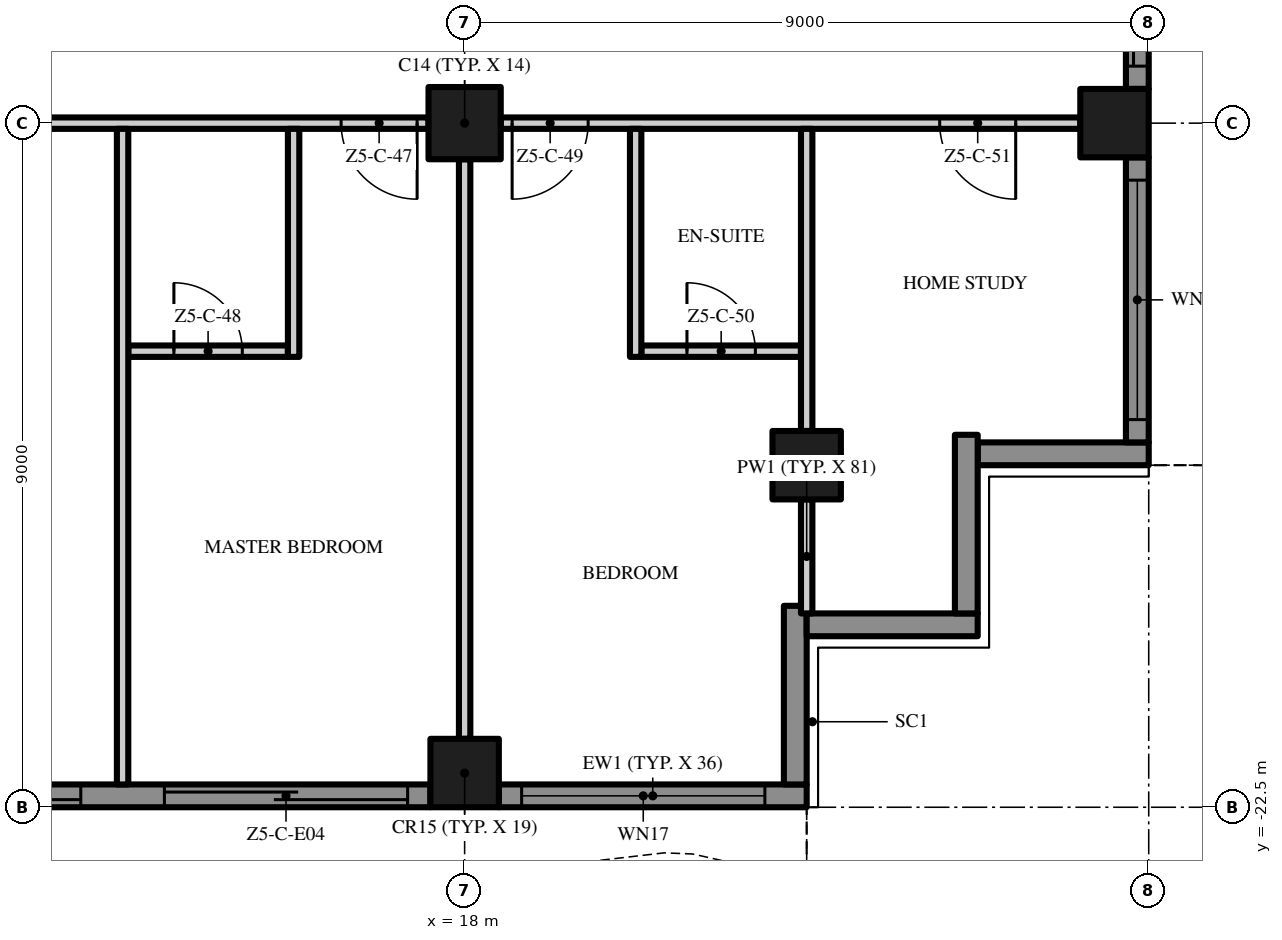
"""IFC4 building model, lengths in metres.
Left out: names, types, materials, properties, quantities, classifications, styles, units other than length and angle.
Written with IfcOpenShell. Run it as: python <this file> out.ifc"""

import sys

from ifc_helpers import new_model, si_unit, direction, frame, frame_2d, origin, origin_2d, place, context, subcontext, project, spatial, polyline, rectangle, outline, extrude, element, fill, save


model = new_model("IFC4")
c1 = context("Model", 3, precision=1e-05, world=origin(), true_north=direction((0.0, 1.0)))
c2 = subcontext(c1, "Body", "Model", "MODEL_VIEW")
j1 = project(units=[si_unit("LENGTHUNIT", "METRE"), si_unit("PLANEANGLEUNIT", "RADIAN")], contexts=[c1])
p1 = place(None, origin())
s1 = spatial("IfcSite", under=j1, at=p1, CompositionType="ELEMENT")
p2 = place(p1, origin())
s2 = spatial("IfcBuilding", under=s1, at=p2, CompositionType="ELEMENT")
p3 = place(p2, frame((0.0, 0.0, 269.2)))
s3 = spatial("IfcBuildingStorey", under=s2, at=p3, CompositionType="ELEMENT", Elevation=269.2)
p4 = place(p3, frame((18.0, -13.5, 0.0), z_axis=(0.0, 0.0, 1.0), x_axis=(1.0, 0.0, 0.0)))
e1 = element("IfcColumn", 1, at=p4, inside=s3, PredefinedType="COLUMN", context=c2, shape_type="SweptSolid", body=[
    extrude(rectangle(XDim=0.95, YDim=0.95, at=origin_2d()), origin(), (0.0, 0.0, 1.0), 3.5),
])
for number, where, z_axis, x_axis in (
    (2, (18.0, -22.05, 0.0), (0.0, 0.0, 1.0), (1.0, 0.0, 0.0)),
    (3, (26.55, -13.5, 0.0), (0.0, 0.0, 1.0), (1.0, 0.0, 0.0)),
    (4, (22.5, -18.0, 0.0), (0.0, 0.0, 1.0), (1.0, 0.0, 0.0)),
):
    element("IfcColumn", number, at=place(p3, frame(where, z_axis=z_axis, x_axis=x_axis)), inside=s3, PredefinedType="COLUMN", context=c2, shape_type="SweptSolid", body=[
        extrude(rectangle(XDim=0.9, YDim=0.9, at=origin_2d()), origin(), (0.0, 0.0, 1.0), 3.5),
    ])
p5 = place(p3, frame((17.55, -22.35, 0.0), z_axis=(0.0, 0.0, 1.0), x_axis=(-1.0, 0.0, 0.0)))
e5 = element("IfcWall", 5, at=p5, inside=s3, PredefinedType="SOLIDWALL", context=c2, shape_type="SweptSolid", body=[
    extrude(rectangle(XDim=8.1, YDim=0.3, at=frame_2d((4.05, 0.0))), origin(), (0.0, 0.0, 1.0), 3.5),
])
p6 = place(p5, frame((4.6, 0.0, 0.0)))
e6 = element("IfcOpeningElement", 6, at=p6, cuts=e5, PredefinedType="OPENING", context=c2, shape_type="SweptSolid", body=[
    extrude(rectangle(XDim=3.2, YDim=2.4, at=frame_2d((1.6, 1.2))), frame((0.0, 0.16, 0.0), z_axis=(0.0, -1.0, 0.0), x_axis=(1.0, 0.0, 0.0)), (0.0, 0.0, 1.0), 0.32),
])
p7 = place(p5, frame((0.3, 0.0, 0.0)))
e7 = element("IfcOpeningElement", 7, at=p7, cuts=e5, PredefinedType="OPENING", context=c2, shape_type="SweptSolid", body=[
    extrude(rectangle(XDim=3.2, YDim=2.4, at=frame_2d((1.6, 1.2))), frame((0.0, 0.16, 0.0), z_axis=(0.0, -1.0, 0.0), x_axis=(1.0, 0.0, 0.0)), (0.0, 0.0, 1.0), 0.32),
])
p8 = place(p3, frame((22.5, -22.35, 0.0), z_axis=(0.0, 0.0, 1.0), x_axis=(-1.0, 0.0, 0.0)))
e8 = element("IfcWall", 8, at=p8, inside=s3, PredefinedType="SOLIDWALL", context=c2, shape_type="SweptSolid", body=[
    extrude(rectangle(XDim=4.05, YDim=0.3, at=frame_2d((2.025, 0.0))), origin(), (0.0, 0.0, 1.0), 3.5),
])
p9 = place(p8, frame((0.55, 0.0, 0.45)))
e9 = element("IfcOpeningElement", 9, at=p9, cuts=e8, PredefinedType="OPENING", context=c2, shape_type="SweptSolid", body=[
    extrude(rectangle(XDim=3.2, YDim=2.65, at=frame_2d((1.6, 1.325))), frame((0.0, 0.16, 0.0), z_axis=(0.0, -1.0, 0.0), x_axis=(1.0, 0.0, 0.0)), (0.0, 0.0, 1.0), 0.32),
])
p10 = place(p3, frame((22.35, -19.85, 0.0), z_axis=(0.0, 0.0, 1.0), x_axis=(0.0, -1.0, 0.0)))
e10 = element("IfcWall", 10, at=p10, inside=s3, PredefinedType="SOLIDWALL", context=c2, shape_type="SweptSolid", body=[
    extrude(rectangle(XDim=2.35, YDim=0.3, at=frame_2d((1.175, 0.0))), origin(), (0.0, 0.0, 1.0), 3.5),
])
p11 = place(p3, frame((24.75, -20.1, 0.0), z_axis=(0.0, 0.0, 1.0), x_axis=(-1.0, 0.0, 0.0)))
e11 = element("IfcWall", 11, at=p11, inside=s3, PredefinedType="SOLIDWALL", context=c2, shape_type="SweptSolid", body=[
    extrude(rectangle(XDim=2.25, YDim=0.3, at=frame_2d((1.125, 0.0))), origin(), (0.0, 0.0, 1.0), 3.5),
])
p12 = place(p3, frame((24.6, -17.6, 0.0), z_axis=(0.0, 0.0, 1.0), x_axis=(0.0, -1.0, 0.0)))
e12 = element("IfcWall", 12, at=p12, inside=s3, PredefinedType="SOLIDWALL", context=c2, shape_type="SweptSolid", body=[
    extrude(rectangle(XDim=2.35, YDim=0.3, at=frame_2d((1.175, 0.0))), origin(), (0.0, 0.0, 1.0), 3.5),
])
p13 = place(p3, frame((27.0, -17.85, 0.0), z_axis=(0.0, 0.0, 1.0), x_axis=(-1.0, 0.0, 0.0)))
e13 = element("IfcWall", 13, at=p13, inside=s3, PredefinedType="SOLIDWALL", context=c2, shape_type="SweptSolid", body=[
    extrude(rectangle(XDim=2.25, YDim=0.3, at=frame_2d((1.125, 0.0))), origin(), (0.0, 0.0, 1.0), 3.5),
])
p14 = place(p3, frame((26.85, -13.95, 0.0), z_axis=(0.0, 0.0, 1.0), x_axis=(0.0, -1.0, 0.0)))
e14 = element("IfcWall", 14, at=p14, inside=s3, PredefinedType="SOLIDWALL", context=c2, shape_type="SweptSolid", body=[
    extrude(rectangle(XDim=3.75, YDim=0.3, at=frame_2d((1.875, 0.0))), origin(), (0.0, 0.0, 1.0), 3.5),
])
p15 = place(p14, frame((0.3, 0.0, 0.45)))
e15 = element("IfcOpeningElement", 15, at=p15, cuts=e14, PredefinedType="OPENING", context=c2, shape_type="SweptSolid", body=[
    extrude(rectangle(XDim=3.15, YDim=2.65, at=frame_2d((1.575, 1.325))), frame((0.0, 0.16, 0.0), z_axis=(0.0, -1.0, 0.0), x_axis=(1.0, 0.0, 0.0)), (0.0, 0.0, 1.0), 0.32),
])
p16 = place(p3, frame((26.85, -4.95, 0.0), z_axis=(0.0, 0.0, 1.0), x_axis=(0.0, -1.0, 0.0)))
e16 = element("IfcWall", 16, at=p16, inside=s3, PredefinedType="SOLIDWALL", context=c2, shape_type="SweptSolid", body=[
    extrude(rectangle(XDim=8.1, YDim=0.3, at=frame_2d((4.05, 0.0))), origin(), (0.0, 0.0, 1.0), 3.5),
])
p17 = place(p16, frame((4.6, 0.0, 0.0)))
e17 = element("IfcOpeningElement", 17, at=p17, cuts=e16, PredefinedType="OPENING", context=c2, shape_type="SweptSolid", body=[
    extrude(rectangle(XDim=3.2, YDim=2.4, at=frame_2d((1.6, 1.2))), frame((0.0, 0.16, 0.0), z_axis=(0.0, -1.0, 0.0), x_axis=(1.0, 0.0, 0.0)), (0.0, 0.0, 1.0), 0.32),
])
p18 = place(p16, frame((0.3, 0.0, 0.45)))
e18 = element("IfcOpeningElement", 18, at=p18, cuts=e16, PredefinedType="OPENING", context=c2, shape_type="SweptSolid", body=[
    extrude(rectangle(XDim=3.2, YDim=2.65, at=frame_2d((1.6, 1.325))), frame((0.0, 0.16, 0.0), z_axis=(0.0, -1.0, 0.0), x_axis=(1.0, 0.0, 0.0)), (0.0, 0.0, 1.0), 0.32),
])
p19 = place(p3, origin())
e19 = element("IfcWall", 19, at=p19, inside=s3, PredefinedType="USERDEFINED", context=c2, shape_type="SweptSolid", body=[
    extrude(outline(polyline([(-22.5, -23.451), (-21.0, -24.112), (-19.5, -24.845), (-18.0, -25.369), (-16.875, -25.5), (-16.5, -25.485), (-15.0, -25.149), (-13.5, -24.488), (-12.0, -23.755), (-10.5, -23.231), (-9.375, -23.1), (-9.0, -23.115), (-7.5, -23.451), (-6.0, -24.112), (-4.5, -24.845), (-3.0, -25.369), (-1.875, -25.5), (-1.5, -25.485), (0.0, -25.149), (1.5, -24.488), (3.0, -23.755), (4.5, -23.231), (5.625, -23.1), (6.0, -23.115), (7.5, -23.451), (9.0, -24.112), (10.5, -24.845), (12.0, -25.369), (13.125, -25.5), (13.5, -25.485), (15.0, -25.149), (16.5, -24.488), (18.0, -23.755), (19.5, -23.231), (20.625, -23.1), (21.0, -23.115), (22.5, -23.451), (22.555, -23.208), (21.033, -22.866), (20.615, -22.849), (19.444, -22.986), (17.904, -23.524), (16.395, -24.261), (14.921, -24.91), (13.467, -25.236), (13.135, -25.249), (12.056, -25.124), (10.596, -24.614), (9.105, -23.885), (7.579, -23.213), (6.033, -22.866), (5.615, -22.849), (4.444, -22.986), (2.904, -23.524), (1.395, -24.261), (-0.079, -24.91), (-1.533, -25.236), (-1.865, -25.249), (-2.944, -25.124), (-4.404, -24.614), (-5.895, -23.885), (-7.421, -23.213), (-8.967, -22.866), (-9.385, -22.849), (-10.556, -22.986), (-12.096, -23.524), (-13.605, -24.261), (-15.079, -24.91), (-16.533, -25.236), (-16.865, -25.249), (-17.944, -25.124), (-19.404, -24.614), (-20.895, -23.885), (-22.399, -23.223), (-22.5, -23.451)])), origin(), (0.0, 0.0, 1.0), 0.9),
])
p20 = place(p3, origin())
e20 = element("IfcWall", 20, at=p20, inside=s3, PredefinedType="USERDEFINED", context=c2, shape_type="SweptSolid", body=[
    extrude(outline(polyline([(27.951, -18.0), (28.612, -16.5), (29.345, -15.0), (29.869, -13.5), (30.0, -12.375), (29.985, -12.0), (29.649, -10.5), (28.988, -9.0), (28.255, -7.5), (27.731, -6.0), (27.6, -4.875), (27.615, -4.5), (27.951, -3.0), (28.612, -1.5), (29.345, 0.0), (29.869, 1.5), (30.0, 2.625), (29.985, 3.0), (29.649, 4.5), (28.988, 6.0), (28.255, 7.5), (27.731, 9.0), (27.6, 10.125), (27.615, 10.5), (27.951, 12.0), (28.612, 13.5), (29.345, 15.0), (29.869, 16.5), (30.0, 17.625), (29.985, 18.0), (29.735, 17.99), (29.749, 17.635), (29.624, 16.556), (29.114, 15.096), (28.385, 13.605), (27.713, 12.079), (27.366, 10.533), (27.349, 10.115), (27.486, 8.944), (28.024, 7.404), (28.761, 5.895), (29.41, 4.421), (29.736, 2.967), (29.749, 2.635), (29.624, 1.556), (29.114, 0.096), (28.385, -1.395), (27.713, -2.921), (27.366, -4.467), (27.349, -4.885), (27.486, -6.056), (28.024, -7.596), (28.761, -9.105), (29.41, -10.579), (29.736, -12.033), (29.749, -12.365), (29.624, -13.444), (29.114, -14.904), (28.385, -16.395), (27.723, -17.899), (27.951, -18.0)])), origin(), (0.0, 0.0, 1.0), 0.9),
])
p21 = place(p3, frame((13.575, -16.5, 0.0), z_axis=(0.0, 0.0, 1.0), x_axis=(1.0, 0.0, 0.0)))
e21 = element("IfcWall", 21, at=p21, inside=s3, PredefinedType="PARTITIONING", context=c2, shape_type="SweptSolid", body=[
    extrude(rectangle(XDim=2.1, YDim=0.15, at=frame_2d((1.05, 0.0))), origin(), (0.0, 0.0, 1.0), 3.5),
])
p22 = place(p21, frame((0.6, 0.0, 0.0)))
e22 = element("IfcOpeningElement", 22, at=p22, cuts=e21, PredefinedType="OPENING", context=c2, shape_type="SweptSolid", body=[
    extrude(rectangle(XDim=0.9, YDim=2.1, at=frame_2d((0.45, 1.05))), frame((0.0, 0.085, 0.0), z_axis=(0.0, -1.0, 0.0), x_axis=(1.0, 0.0, 0.0)), (0.0, 0.0, 1.0), 0.17),
])
p23 = place(p3, frame((20.325, -16.5, 0.0), z_axis=(0.0, 0.0, 1.0), x_axis=(1.0, 0.0, 0.0)))
e23 = element("IfcWall", 23, at=p23, inside=s3, PredefinedType="PARTITIONING", context=c2, shape_type="SweptSolid", body=[
    extrude(rectangle(XDim=2.1, YDim=0.15, at=frame_2d((1.05, 0.0))), origin(), (0.0, 0.0, 1.0), 3.5),
])
p24 = place(p23, frame((0.6, 0.0, 0.0)))
e24 = element("IfcOpeningElement", 24, at=p24, cuts=e23, PredefinedType="OPENING", context=c2, shape_type="SweptSolid", body=[
    extrude(rectangle(XDim=0.9, YDim=2.1, at=frame_2d((0.45, 1.05))), frame((0.0, 0.085, 0.0), z_axis=(0.0, -1.0, 0.0), x_axis=(1.0, 0.0, 0.0)), (0.0, 0.0, 1.0), 0.17),
])
p25 = place(p3, frame((17.525, -13.5, 0.0), z_axis=(0.0, 0.0, 1.0), x_axis=(-1.0, 0.0, 0.0)))
e25 = element("IfcWall", 25, at=p25, inside=s3, PredefinedType="PARTITIONING", context=c2, shape_type="SweptSolid", body=[
    extrude(rectangle(XDim=8.05, YDim=0.15, at=frame_2d((4.025, 0.0))), origin(), (0.0, 0.0, 1.0), 3.5),
])
p26 = place(p25, frame((6.1, 0.0, 0.0)))
e26 = element("IfcOpeningElement", 26, at=p26, cuts=e25, PredefinedType="OPENING", context=c2, shape_type="SweptSolid", body=[
    extrude(rectangle(XDim=1.8, YDim=2.4, at=frame_2d((0.9, 1.2))), frame((0.0, 0.085, 0.0), z_axis=(0.0, -1.0, 0.0), x_axis=(1.0, 0.0, 0.0)), (0.0, 0.0, 1.0), 0.17),
])
p27 = place(p25, frame((0.15, 0.0, 0.0)))
e27 = element("IfcOpeningElement", 27, at=p27, cuts=e25, PredefinedType="OPENING", context=c2, shape_type="SweptSolid", body=[
    extrude(rectangle(XDim=1.0, YDim=2.4, at=frame_2d((0.5, 1.2))), frame((0.0, 0.085, 0.0), z_axis=(0.0, -1.0, 0.0), x_axis=(1.0, 0.0, 0.0)), (0.0, 0.0, 1.0), 0.17),
])
p28 = place(p3, frame((26.1, -13.5, 0.0), z_axis=(0.0, 0.0, 1.0), x_axis=(-1.0, 0.0, 0.0)))
e28 = element("IfcWall", 28, at=p28, inside=s3, PredefinedType="PARTITIONING", context=c2, shape_type="SweptSolid", body=[
    extrude(rectangle(XDim=7.625, YDim=0.15, at=frame_2d((3.812, 0.0))), origin(), (0.0, 0.0, 1.0), 3.5),
])
p29 = place(p28, frame((6.475, 0.0, 0.0)))
e29 = element("IfcOpeningElement", 29, at=p29, cuts=e28, PredefinedType="OPENING", context=c2, shape_type="SweptSolid", body=[
    extrude(rectangle(XDim=1.0, YDim=2.4, at=frame_2d((0.5, 1.2))), frame((0.0, 0.085, 0.0), z_axis=(0.0, -1.0, 0.0), x_axis=(1.0, 0.0, 0.0)), (0.0, 0.0, 1.0), 0.17),
])
p30 = place(p28, frame((0.85, 0.0, 0.0)))
e30 = element("IfcOpeningElement", 30, at=p30, cuts=e28, PredefinedType="OPENING", context=c2, shape_type="SweptSolid", body=[
    extrude(rectangle(XDim=1.0, YDim=2.4, at=frame_2d((0.5, 1.2))), frame((0.0, 0.085, 0.0), z_axis=(0.0, -1.0, 0.0), x_axis=(1.0, 0.0, 0.0)), (0.0, 0.0, 1.0), 0.17),
])
p31 = place(p3, frame((13.5, -22.2, 0.0), z_axis=(0.0, 0.0, 1.0), x_axis=(0.0, 1.0, 0.0)))
e31 = element("IfcWall", 31, at=p31, inside=s3, PredefinedType="PARTITIONING", context=c2, shape_type="SweptSolid", body=[
    extrude(rectangle(XDim=8.625, YDim=0.15, at=frame_2d((4.312, 0.0))), origin(), (0.0, 0.0, 1.0), 3.5),
])
p32 = place(p3, frame((15.75, -16.575, 0.0), z_axis=(0.0, 0.0, 1.0), x_axis=(0.0, 1.0, 0.0)))
e32 = element("IfcWall", 32, at=p32, inside=s3, PredefinedType="PARTITIONING", context=c2, shape_type="SweptSolid", body=[
    extrude(rectangle(XDim=3.0, YDim=0.15, at=frame_2d((1.5, 0.0))), origin(), (0.0, 0.0, 1.0), 3.5),
])
p33 = place(p3, frame((18.0, -21.6, 0.0), z_axis=(0.0, 0.0, 1.0), x_axis=(0.0, 1.0, 0.0)))
e33 = element("IfcWall", 33, at=p33, inside=s3, PredefinedType="PARTITIONING", context=c2, shape_type="SweptSolid", body=[
    extrude(rectangle(XDim=7.625, YDim=0.15, at=frame_2d((3.812, 0.0))), origin(), (0.0, 0.0, 1.0), 3.5),
])
p34 = place(p3, frame((20.25, -16.575, 0.0), z_axis=(0.0, 0.0, 1.0), x_axis=(0.0, 1.0, 0.0)))
e34 = element("IfcWall", 34, at=p34, inside=s3, PredefinedType="PARTITIONING", context=c2, shape_type="SweptSolid", body=[
    extrude(rectangle(XDim=3.0, YDim=0.15, at=frame_2d((1.5, 0.0))), origin(), (0.0, 0.0, 1.0), 3.5),
])
p35 = place(p3, frame((22.5, -19.95, 0.0), z_axis=(0.0, 0.0, 1.0), x_axis=(0.0, 1.0, 0.0)))
e35 = element("IfcWall", 35, at=p35, inside=s3, PredefinedType="PARTITIONING", context=c2, shape_type="SweptSolid", body=[
    extrude(rectangle(XDim=1.5, YDim=0.15, at=frame_2d((0.75, 0.0))), origin(), (0.0, 0.0, 1.0), 3.5),
])
p36 = place(p3, frame((22.5, -17.55, 0.0), z_axis=(0.0, 0.0, 1.0), x_axis=(0.0, 1.0, 0.0)))
e36 = element("IfcWall", 36, at=p36, inside=s3, PredefinedType="PARTITIONING", context=c2, shape_type="SweptSolid", body=[
    extrude(rectangle(XDim=3.975, YDim=0.15, at=frame_2d((1.988, 0.0))), origin(), (0.0, 0.0, 1.0), 3.5),
])
p37 = place(p6, origin())
e37 = element("IfcDoor", 37, at=p37, inside=s3, OperationType="SINGLE_SWING_LEFT", PredefinedType="DOOR", context=c2, shape_type="SweptSolid", body=[
    extrude(rectangle(XDim=3.2, YDim=2.4, at=frame_2d((1.6, 1.2))), frame((0.0, 0.025, 0.0), z_axis=(0.0, -1.0, 0.0), x_axis=(1.0, 0.0, 0.0)), (0.0, 0.0, 1.0), 0.05),
])
fill(e6, e37)
p38 = place(p7, origin())
e38 = element("IfcDoor", 38, at=p38, inside=s3, OperationType="SINGLE_SWING_LEFT", PredefinedType="DOOR", context=c2, shape_type="SweptSolid", body=[
    extrude(rectangle(XDim=3.2, YDim=2.4, at=frame_2d((1.6, 1.2))), frame((0.0, 0.025, 0.0), z_axis=(0.0, -1.0, 0.0), x_axis=(1.0, 0.0, 0.0)), (0.0, 0.0, 1.0), 0.05),
])
fill(e7, e38)
p39 = place(p9, origin())
e39 = element("IfcWindow", 39, at=p39, inside=s3, PartitioningType="SINGLE_PANEL", PredefinedType="WINDOW", context=c2, shape_type="SweptSolid", body=[
    extrude(rectangle(XDim=3.2, YDim=2.65, at=frame_2d((1.6, 1.325))), frame((0.0, 0.03, 0.0), z_axis=(0.0, -1.0, 0.0), x_axis=(1.0, 0.0, 0.0)), (0.0, 0.0, 1.0), 0.06),
])
fill(e9, e39)
p40 = place(p15, origin())
e40 = element("IfcWindow", 40, at=p40, inside=s3, PartitioningType="SINGLE_PANEL", PredefinedType="WINDOW", context=c2, shape_type="SweptSolid", body=[
    extrude(rectangle(XDim=3.15, YDim=2.65, at=frame_2d((1.575, 1.325))), frame((0.0, 0.03, 0.0), z_axis=(0.0, -1.0, 0.0), x_axis=(1.0, 0.0, 0.0)), (0.0, 0.0, 1.0), 0.06),
])
fill(e15, e40)
p41 = place(p17, origin())
e41 = element("IfcDoor", 41, at=p41, inside=s3, OperationType="SINGLE_SWING_LEFT", PredefinedType="DOOR", context=c2, shape_type="SweptSolid", body=[
    extrude(rectangle(XDim=3.2, YDim=2.4, at=frame_2d((1.6, 1.2))), frame((0.0, 0.025, 0.0), z_axis=(0.0, -1.0, 0.0), x_axis=(1.0, 0.0, 0.0)), (0.0, 0.0, 1.0), 0.05),
])
fill(e17, e41)
p42 = place(p27, origin())
e42 = element("IfcDoor", 42, at=p42, inside=s3, OperationType="SINGLE_SWING_LEFT", PredefinedType="DOOR", context=c2, shape_type="SweptSolid", body=[
    extrude(rectangle(XDim=1.0, YDim=2.4, at=frame_2d((0.5, 1.2))), frame((0.0, 0.025, 0.0), z_axis=(0.0, -1.0, 0.0), x_axis=(1.0, 0.0, 0.0)), (0.0, 0.0, 1.0), 0.05),
])
fill(e27, e42)
p43 = place(p22, origin())
e43 = element("IfcDoor", 43, at=p43, inside=s3, OperationType="SINGLE_SWING_LEFT", PredefinedType="DOOR", context=c2, shape_type="SweptSolid", body=[
    extrude(rectangle(XDim=0.9, YDim=2.1, at=frame_2d((0.45, 1.05))), frame((0.0, 0.025, 0.0), z_axis=(0.0, -1.0, 0.0), x_axis=(1.0, 0.0, 0.0)), (0.0, 0.0, 1.0), 0.05),
])
fill(e22, e43)
p44 = place(p29, origin())
e44 = element("IfcDoor", 44, at=p44, inside=s3, OperationType="SINGLE_SWING_RIGHT", PredefinedType="DOOR", context=c2, shape_type="SweptSolid", body=[
    extrude(rectangle(XDim=1.0, YDim=2.4, at=frame_2d((0.5, 1.2))), frame((0.0, 0.025, 0.0), z_axis=(0.0, -1.0, 0.0), x_axis=(1.0, 0.0, 0.0)), (0.0, 0.0, 1.0), 0.05),
])
fill(e29, e44)
p45 = place(p24, origin())
e45 = element("IfcDoor", 45, at=p45, inside=s3, OperationType="SINGLE_SWING_LEFT", PredefinedType="DOOR", context=c2, shape_type="SweptSolid", body=[
    extrude(rectangle(XDim=0.9, YDim=2.1, at=frame_2d((0.45, 1.05))), frame((0.0, 0.025, 0.0), z_axis=(0.0, -1.0, 0.0), x_axis=(1.0, 0.0, 0.0)), (0.0, 0.0, 1.0), 0.05),
])
fill(e24, e45)
p46 = place(p30, origin())
e46 = element("IfcDoor", 46, at=p46, inside=s3, OperationType="SINGLE_SWING_LEFT", PredefinedType="DOOR", context=c2, shape_type="SweptSolid", body=[
    extrude(rectangle(XDim=1.0, YDim=2.4, at=frame_2d((0.5, 1.2))), frame((0.0, 0.025, 0.0), z_axis=(0.0, -1.0, 0.0), x_axis=(1.0, 0.0, 0.0)), (0.0, 0.0, 1.0), 0.05),
])
fill(e30, e46)
save(model, sys.argv[1])
